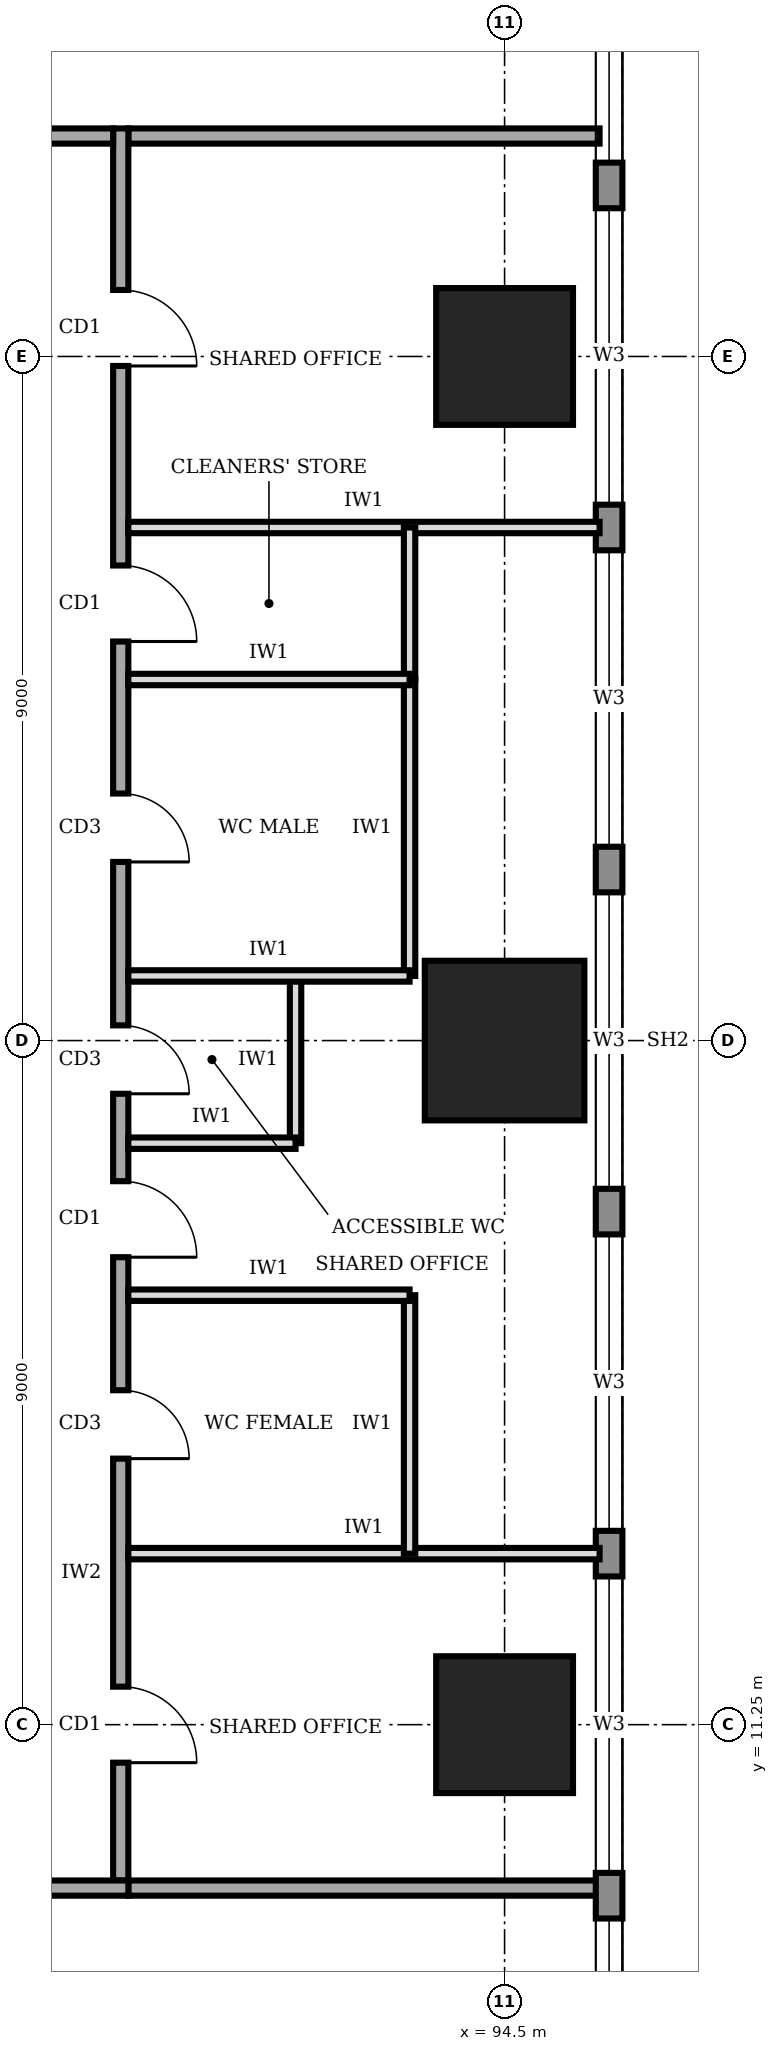
"""IFC4 building model, lengths in metres.
Left out: names, types, materials, properties, quantities, classifications, styles, units other than length and angle.
Written with IfcOpenShell. Run it as: python <this file> out.ifc"""

import sys

from ifc_helpers import new_model, si_unit, direction, frame, frame_2d, origin, origin_2d, place, context, subcontext, project, spatial, rectangle, extrude, element, fill, save


model = new_model("IFC4")
c1 = context("Model", 3, precision=1e-05, world=origin(), true_north=direction((0.0, 1.0)))
c2 = subcontext(c1, "Body", "Model", "MODEL_VIEW")
j1 = project(units=[si_unit("LENGTHUNIT", "METRE"), si_unit("PLANEANGLEUNIT", "RADIAN")], contexts=[c1])
p1 = place(None, origin())
s1 = spatial("IfcSite", under=j1, at=p1, CompositionType="ELEMENT")
p2 = place(p1, origin())
s2 = spatial("IfcBuilding", under=s1, at=p2, CompositionType="ELEMENT")
p3 = place(p2, frame((0.0, 0.0, 181.0)))
s3 = spatial("IfcBuildingStorey", under=s2, at=p3, CompositionType="ELEMENT", Elevation=181.0)
p4 = place(p3, frame((94.5, 11.25, 0.0), z_axis=(0.0, 0.0, 1.0), x_axis=(1.0, 0.0, 0.0)))
e1 = element("IfcColumn", 1, at=p4, inside=s3, PredefinedType="COLUMN", context=c2, shape_type="SweptSolid", body=[
    extrude(rectangle(XDim=1.8, YDim=1.8, at=origin_2d()), origin(), (0.0, 0.0, 1.0), 4.0),
])
p5 = place(p3, frame((94.5, 20.25, 0.0), z_axis=(0.0, 0.0, 1.0), x_axis=(1.0, 0.0, 0.0)))
e2 = element("IfcColumn", 2, at=p5, inside=s3, PredefinedType="COLUMN", context=c2, shape_type="SweptSolid", body=[
    extrude(rectangle(XDim=2.1, YDim=2.1, at=origin_2d()), origin(), (0.0, 0.0, 1.0), 4.0),
])
p6 = place(p3, frame((94.5, 29.25, 0.0), z_axis=(0.0, 0.0, 1.0), x_axis=(1.0, 0.0, 0.0)))
e3 = element("IfcColumn", 3, at=p6, inside=s3, PredefinedType="COLUMN", context=c2, shape_type="SweptSolid", body=[
    extrude(rectangle(XDim=1.8, YDim=1.8, at=origin_2d()), origin(), (0.0, 0.0, 1.0), 4.0),
])
p7 = place(p3, frame((95.875, 3.32, 0.0), z_axis=(0.0, 0.0, 1.0), x_axis=(0.0, 1.0, 0.0)))
e4 = element("IfcWall", 4, at=p7, inside=s3, PredefinedType="STANDARD", context=c2, shape_type="SweptSolid", body=[
    extrude(rectangle(XDim=33.86, YDim=0.35, at=frame_2d((16.93, 0.0))), origin(), (0.0, 0.0, 1.0), 3.75),
])
p8 = place(p7, frame((1.48, 0.0, 0.95)))
e5 = element("IfcOpeningElement", 5, at=p8, cuts=e4, PredefinedType="OPENING", context=c2, shape_type="SweptSolid", body=[
    extrude(rectangle(XDim=3.9, YDim=1.8, at=frame_2d((1.95, 0.9))), frame((0.0, 0.185, 0.0), z_axis=(0.0, -1.0, 0.0), x_axis=(1.0, 0.0, 0.0)), (0.0, 0.0, 1.0), 0.37),
])
p9 = place(p7, frame((5.98, 0.0, 0.95)))
e6 = element("IfcOpeningElement", 6, at=p9, cuts=e4, PredefinedType="OPENING", context=c2, shape_type="SweptSolid", body=[
    extrude(rectangle(XDim=3.9, YDim=1.8, at=frame_2d((1.95, 0.9))), frame((0.0, 0.185, 0.0), z_axis=(0.0, -1.0, 0.0), x_axis=(1.0, 0.0, 0.0)), (0.0, 0.0, 1.0), 0.37),
])
p10 = place(p7, frame((10.48, 0.0, 0.95)))
e7 = element("IfcOpeningElement", 7, at=p10, cuts=e4, PredefinedType="OPENING", context=c2, shape_type="SweptSolid", body=[
    extrude(rectangle(XDim=3.9, YDim=1.8, at=frame_2d((1.95, 0.9))), frame((0.0, 0.185, 0.0), z_axis=(0.0, -1.0, 0.0), x_axis=(1.0, 0.0, 0.0)), (0.0, 0.0, 1.0), 0.37),
])
p11 = place(p7, frame((14.98, 0.0, 0.95)))
e8 = element("IfcOpeningElement", 8, at=p11, cuts=e4, PredefinedType="OPENING", context=c2, shape_type="SweptSolid", body=[
    extrude(rectangle(XDim=3.9, YDim=1.8, at=frame_2d((1.95, 0.9))), frame((0.0, 0.185, 0.0), z_axis=(0.0, -1.0, 0.0), x_axis=(1.0, 0.0, 0.0)), (0.0, 0.0, 1.0), 0.37),
])
p12 = place(p7, frame((19.48, 0.0, 0.95)))
e9 = element("IfcOpeningElement", 9, at=p12, cuts=e4, PredefinedType="OPENING", context=c2, shape_type="SweptSolid", body=[
    extrude(rectangle(XDim=3.9, YDim=1.8, at=frame_2d((1.95, 0.9))), frame((0.0, 0.185, 0.0), z_axis=(0.0, -1.0, 0.0), x_axis=(1.0, 0.0, 0.0)), (0.0, 0.0, 1.0), 0.37),
])
p13 = place(p7, frame((23.98, 0.0, 0.95)))
e10 = element("IfcOpeningElement", 10, at=p13, cuts=e4, PredefinedType="OPENING", context=c2, shape_type="SweptSolid", body=[
    extrude(rectangle(XDim=3.9, YDim=1.8, at=frame_2d((1.95, 0.9))), frame((0.0, 0.185, 0.0), z_axis=(0.0, -1.0, 0.0), x_axis=(1.0, 0.0, 0.0)), (0.0, 0.0, 1.0), 0.37),
])
p14 = place(p7, frame((28.48, 0.0, 0.95)))
e11 = element("IfcOpeningElement", 11, at=p14, cuts=e4, PredefinedType="OPENING", context=c2, shape_type="SweptSolid", body=[
    extrude(rectangle(XDim=3.9, YDim=1.8, at=frame_2d((1.95, 0.9))), frame((0.0, 0.185, 0.0), z_axis=(0.0, -1.0, 0.0), x_axis=(1.0, 0.0, 0.0)), (0.0, 0.0, 1.0), 0.37),
])
p15 = place(p3, frame((72.65, 9.1, 0.0), z_axis=(0.0, 0.0, 1.0), x_axis=(1.0, 0.0, 0.0)))
e12 = element("IfcWall", 12, at=p15, inside=s3, PredefinedType="SOLIDWALL", context=c2, shape_type="SweptSolid", body=[
    extrude(rectangle(XDim=16.9, YDim=0.2, at=frame_2d((8.45, 0.0))), origin(), (0.0, 0.0, 1.0), 3.75),
])
p16 = place(p15, frame((1.325, 0.0, 0.0)))
e13 = element("IfcOpeningElement", 13, at=p16, cuts=e12, PredefinedType="OPENING", context=c2, shape_type="SweptSolid", body=[
    extrude(rectangle(XDim=1.0, YDim=2.1, at=frame_2d((0.5, 1.05))), frame((0.0, 0.11, 0.0), z_axis=(0.0, -1.0, 0.0), x_axis=(1.0, 0.0, 0.0)), (0.0, 0.0, 1.0), 0.22),
])
p17 = place(p15, frame((9.475, 0.0, 0.0)))
e14 = element("IfcOpeningElement", 14, at=p17, cuts=e12, PredefinedType="OPENING", context=c2, shape_type="SweptSolid", body=[
    extrude(rectangle(XDim=1.8, YDim=2.1, at=frame_2d((0.9, 1.05))), frame((0.0, 0.11, 0.0), z_axis=(0.0, -1.0, 0.0), x_axis=(1.0, 0.0, 0.0)), (0.0, 0.0, 1.0), 0.22),
])
p18 = place(p3, frame((89.45, 9.2, 0.0), z_axis=(0.0, 0.0, 1.0), x_axis=(0.0, 1.0, 0.0)))
e15 = element("IfcWall", 15, at=p18, inside=s3, PredefinedType="SOLIDWALL", context=c2, shape_type="SweptSolid", body=[
    extrude(rectangle(XDim=23.05, YDim=0.2, at=frame_2d((11.525, 0.0))), origin(), (0.0, 0.0, 1.0), 3.75),
])
p19 = place(p18, frame((1.55, 0.0, 0.0)))
e16 = element("IfcOpeningElement", 16, at=p19, cuts=e15, PredefinedType="OPENING", context=c2, shape_type="SweptSolid", body=[
    extrude(rectangle(XDim=1.0, YDim=2.1, at=frame_2d((0.5, 1.05))), frame((0.0, 0.11, 0.0), z_axis=(0.0, -1.0, 0.0), x_axis=(1.0, 0.0, 0.0)), (0.0, 0.0, 1.0), 0.22),
])
p20 = place(p18, frame((5.55, 0.0, 0.0)))
e17 = element("IfcOpeningElement", 17, at=p20, cuts=e15, PredefinedType="OPENING", context=c2, shape_type="SweptSolid", body=[
    extrude(rectangle(XDim=0.9, YDim=2.1, at=frame_2d((0.45, 1.05))), frame((0.0, 0.11, 0.0), z_axis=(0.0, -1.0, 0.0), x_axis=(1.0, 0.0, 0.0)), (0.0, 0.0, 1.0), 0.22),
])
p21 = place(p18, frame((10.35, 0.0, 0.0)))
e18 = element("IfcOpeningElement", 18, at=p21, cuts=e15, PredefinedType="OPENING", context=c2, shape_type="SweptSolid", body=[
    extrude(rectangle(XDim=0.9, YDim=2.1, at=frame_2d((0.45, 1.05))), frame((0.0, 0.11, 0.0), z_axis=(0.0, -1.0, 0.0), x_axis=(1.0, 0.0, 0.0)), (0.0, 0.0, 1.0), 0.22),
])
p22 = place(p18, frame((13.4, 0.0, 0.0)))
e19 = element("IfcOpeningElement", 19, at=p22, cuts=e15, PredefinedType="OPENING", context=c2, shape_type="SweptSolid", body=[
    extrude(rectangle(XDim=0.9, YDim=2.1, at=frame_2d((0.45, 1.05))), frame((0.0, 0.11, 0.0), z_axis=(0.0, -1.0, 0.0), x_axis=(1.0, 0.0, 0.0)), (0.0, 0.0, 1.0), 0.22),
])
p23 = place(p18, frame((16.3, 0.0, 0.0)))
e20 = element("IfcOpeningElement", 20, at=p23, cuts=e15, PredefinedType="OPENING", context=c2, shape_type="SweptSolid", body=[
    extrude(rectangle(XDim=1.0, YDim=2.1, at=frame_2d((0.5, 1.05))), frame((0.0, 0.11, 0.0), z_axis=(0.0, -1.0, 0.0), x_axis=(1.0, 0.0, 0.0)), (0.0, 0.0, 1.0), 0.22),
])
p24 = place(p18, frame((8.2, 0.0, 0.0)))
e21 = element("IfcOpeningElement", 21, at=p24, cuts=e15, PredefinedType="OPENING", context=c2, shape_type="SweptSolid", body=[
    extrude(rectangle(XDim=1.0, YDim=2.1, at=frame_2d((0.5, 1.05))), frame((0.0, 0.11, 0.0), z_axis=(0.0, -1.0, 0.0), x_axis=(1.0, 0.0, 0.0)), (0.0, 0.0, 1.0), 0.22),
])
p25 = place(p18, frame((19.925, 0.0, 0.0)))
e22 = element("IfcOpeningElement", 22, at=p25, cuts=e15, PredefinedType="OPENING", context=c2, shape_type="SweptSolid", body=[
    extrude(rectangle(XDim=1.0, YDim=2.1, at=frame_2d((0.5, 1.05))), frame((0.0, 0.11, 0.0), z_axis=(0.0, -1.0, 0.0), x_axis=(1.0, 0.0, 0.0)), (0.0, 0.0, 1.0), 0.22),
])
p26 = place(p3, frame((89.35, 32.15, 0.0), z_axis=(0.0, 0.0, 1.0), x_axis=(-1.0, 0.0, 0.0)))
e23 = element("IfcWall", 23, at=p26, inside=s3, PredefinedType="SOLIDWALL", context=c2, shape_type="SweptSolid", body=[
    extrude(rectangle(XDim=16.9, YDim=0.2, at=frame_2d((8.45, 0.0))), origin(), (0.0, 0.0, 1.0), 3.75),
])
p27 = place(p26, frame((3.575, 0.0, 0.0)))
e24 = element("IfcOpeningElement", 24, at=p27, cuts=e23, PredefinedType="OPENING", context=c2, shape_type="SweptSolid", body=[
    extrude(rectangle(XDim=1.0, YDim=2.1, at=frame_2d((0.5, 1.05))), frame((0.0, 0.11, 0.0), z_axis=(0.0, -1.0, 0.0), x_axis=(1.0, 0.0, 0.0)), (0.0, 0.0, 1.0), 0.22),
])
for number, where, z_axis, x_axis in (
    (25, (89.55, 9.1, 0.0), (0.0, 0.0, 1.0), (1.0, 0.0, 0.0)),
    (26, (89.55, 32.15, 0.0), (0.0, 0.0, 1.0), (1.0, 0.0, 0.0)),
):
    element("IfcWall", number, at=place(p3, frame(where, z_axis=z_axis, x_axis=x_axis)), inside=s3, PredefinedType="SOLIDWALL", context=c2, shape_type="SweptSolid", body=[
        extrude(rectangle(XDim=6.2, YDim=0.2, at=frame_2d((3.1, 0.0))), origin(), (0.0, 0.0, 1.0), 3.75),
    ])
for number, where, z_axis, x_axis in (
    (27, (89.55, 13.5, 0.0), (0.0, 0.0, 1.0), (1.0, 0.0, 0.0)),
    (28, (89.55, 27.0, 0.0), (0.0, 0.0, 1.0), (1.0, 0.0, 0.0)),
):
    element("IfcWall", number, at=place(p3, frame(where, z_axis=z_axis, x_axis=x_axis)), inside=s3, PredefinedType="PARTITIONING", context=c2, shape_type="SweptSolid", body=[
        extrude(rectangle(XDim=6.2, YDim=0.15, at=frame_2d((3.1, 0.0))), origin(), (0.0, 0.0, 1.0), 3.75),
    ])
p28 = place(p3, frame((89.55, 16.9, 0.0), z_axis=(0.0, 0.0, 1.0), x_axis=(1.0, 0.0, 0.0)))
e29 = element("IfcWall", 29, at=p28, inside=s3, PredefinedType="PARTITIONING", context=c2, shape_type="SweptSolid", body=[
    extrude(rectangle(XDim=3.7, YDim=0.15, at=frame_2d((1.85, 0.0))), origin(), (0.0, 0.0, 1.0), 3.75),
])
p29 = place(p3, frame((89.55, 18.9, 0.0), z_axis=(0.0, 0.0, 1.0), x_axis=(1.0, 0.0, 0.0)))
e30 = element("IfcWall", 30, at=p29, inside=s3, PredefinedType="PARTITIONING", context=c2, shape_type="SweptSolid", body=[
    extrude(rectangle(XDim=2.2, YDim=0.15, at=frame_2d((1.1, 0.0))), origin(), (0.0, 0.0, 1.0), 3.75),
])
p30 = place(p3, frame((89.55, 21.1, 0.0), z_axis=(0.0, 0.0, 1.0), x_axis=(1.0, 0.0, 0.0)))
e31 = element("IfcWall", 31, at=p30, inside=s3, PredefinedType="PARTITIONING", context=c2, shape_type="SweptSolid", body=[
    extrude(rectangle(XDim=3.7, YDim=0.15, at=frame_2d((1.85, 0.0))), origin(), (0.0, 0.0, 1.0), 2.85),
])
p31 = place(p3, frame((89.55, 25.0, 0.0), z_axis=(0.0, 0.0, 1.0), x_axis=(1.0, 0.0, 0.0)))
e32 = element("IfcWall", 32, at=p31, inside=s3, PredefinedType="PARTITIONING", context=c2, shape_type="SweptSolid", body=[
    extrude(rectangle(XDim=3.7, YDim=0.15, at=frame_2d((1.85, 0.0))), origin(), (0.0, 0.0, 1.0), 3.75),
])
p32 = place(p3, frame((93.25, 13.5, 0.0), z_axis=(0.0, 0.0, 1.0), x_axis=(0.0, 1.0, 0.0)))
e33 = element("IfcWall", 33, at=p32, inside=s3, PredefinedType="PARTITIONING", context=c2, shape_type="SweptSolid", body=[
    extrude(rectangle(XDim=3.4, YDim=0.15, at=frame_2d((1.7, 0.0))), origin(), (0.0, 0.0, 1.0), 3.75),
])
p33 = place(p3, frame((91.75, 18.9, 0.0), z_axis=(0.0, 0.0, 1.0), x_axis=(0.0, 1.0, 0.0)))
e34 = element("IfcWall", 34, at=p33, inside=s3, PredefinedType="PARTITIONING", context=c2, shape_type="SweptSolid", body=[
    extrude(rectangle(XDim=2.2, YDim=0.15, at=frame_2d((1.1, 0.0))), origin(), (0.0, 0.0, 1.0), 3.75),
])
p34 = place(p3, frame((93.25, 21.1, 0.0), z_axis=(0.0, 0.0, 1.0), x_axis=(0.0, 1.0, 0.0)))
e35 = element("IfcWall", 35, at=p34, inside=s3, PredefinedType="PARTITIONING", context=c2, shape_type="SweptSolid", body=[
    extrude(rectangle(XDim=3.9, YDim=0.15, at=frame_2d((1.95, 0.0))), origin(), (0.0, 0.0, 1.0), 3.75),
])
p35 = place(p3, frame((93.25, 25.0, 0.0), z_axis=(0.0, 0.0, 1.0), x_axis=(0.0, 1.0, 0.0)))
e36 = element("IfcWall", 36, at=p35, inside=s3, PredefinedType="PARTITIONING", context=c2, shape_type="SweptSolid", body=[
    extrude(rectangle(XDim=2.0, YDim=0.15, at=frame_2d((1.0, 0.0))), origin(), (0.0, 0.0, 1.0), 3.75),
])
p36 = place(p8, origin())
e37 = element("IfcWindow", 37, at=p36, inside=s3, PartitioningType="SINGLE_PANEL", PredefinedType="WINDOW", context=c2, shape_type="SweptSolid", body=[
    extrude(rectangle(XDim=3.9, YDim=1.8, at=frame_2d((1.95, 0.9))), frame((0.0, 0.03, 0.0), z_axis=(0.0, -1.0, 0.0), x_axis=(1.0, 0.0, 0.0)), (0.0, 0.0, 1.0), 0.06),
])
fill(e5, e37)
p37 = place(p9, origin())
e38 = element("IfcWindow", 38, at=p37, inside=s3, PartitioningType="SINGLE_PANEL", PredefinedType="WINDOW", context=c2, shape_type="SweptSolid", body=[
    extrude(rectangle(XDim=3.9, YDim=1.8, at=frame_2d((1.95, 0.9))), frame((0.0, 0.03, 0.0), z_axis=(0.0, -1.0, 0.0), x_axis=(1.0, 0.0, 0.0)), (0.0, 0.0, 1.0), 0.06),
])
fill(e6, e38)
p38 = place(p10, origin())
e39 = element("IfcWindow", 39, at=p38, inside=s3, PartitioningType="SINGLE_PANEL", PredefinedType="WINDOW", context=c2, shape_type="SweptSolid", body=[
    extrude(rectangle(XDim=3.9, YDim=1.8, at=frame_2d((1.95, 0.9))), frame((0.0, 0.03, 0.0), z_axis=(0.0, -1.0, 0.0), x_axis=(1.0, 0.0, 0.0)), (0.0, 0.0, 1.0), 0.06),
])
fill(e7, e39)
p39 = place(p11, origin())
e40 = element("IfcWindow", 40, at=p39, inside=s3, PartitioningType="SINGLE_PANEL", PredefinedType="WINDOW", context=c2, shape_type="SweptSolid", body=[
    extrude(rectangle(XDim=3.9, YDim=1.8, at=frame_2d((1.95, 0.9))), frame((0.0, 0.03, 0.0), z_axis=(0.0, -1.0, 0.0), x_axis=(1.0, 0.0, 0.0)), (0.0, 0.0, 1.0), 0.06),
])
fill(e8, e40)
p40 = place(p12, origin())
e41 = element("IfcWindow", 41, at=p40, inside=s3, PartitioningType="SINGLE_PANEL", PredefinedType="WINDOW", context=c2, shape_type="SweptSolid", body=[
    extrude(rectangle(XDim=3.9, YDim=1.8, at=frame_2d((1.95, 0.9))), frame((0.0, 0.03, 0.0), z_axis=(0.0, -1.0, 0.0), x_axis=(1.0, 0.0, 0.0)), (0.0, 0.0, 1.0), 0.06),
])
fill(e9, e41)
p41 = place(p13, origin())
e42 = element("IfcWindow", 42, at=p41, inside=s3, PartitioningType="SINGLE_PANEL", PredefinedType="WINDOW", context=c2, shape_type="SweptSolid", body=[
    extrude(rectangle(XDim=3.9, YDim=1.8, at=frame_2d((1.95, 0.9))), frame((0.0, 0.03, 0.0), z_axis=(0.0, -1.0, 0.0), x_axis=(1.0, 0.0, 0.0)), (0.0, 0.0, 1.0), 0.06),
])
fill(e10, e42)
p42 = place(p14, origin())
e43 = element("IfcWindow", 43, at=p42, inside=s3, PartitioningType="SINGLE_PANEL", PredefinedType="WINDOW", context=c2, shape_type="SweptSolid", body=[
    extrude(rectangle(XDim=3.9, YDim=1.8, at=frame_2d((1.95, 0.9))), frame((0.0, 0.03, 0.0), z_axis=(0.0, -1.0, 0.0), x_axis=(1.0, 0.0, 0.0)), (0.0, 0.0, 1.0), 0.06),
])
fill(e11, e43)
p43 = place(p19, frame((1.0, 0.0, 0.0), z_axis=(0.0, 0.0, 1.0), x_axis=(-1.0, 0.0, 0.0)))
e44 = element("IfcDoor", 44, at=p43, inside=s3, OperationType="SINGLE_SWING_RIGHT", PredefinedType="DOOR", context=c2, shape_type="SweptSolid", body=[
    extrude(rectangle(XDim=1.0, YDim=2.1, at=frame_2d((0.5, 1.05))), frame((0.0, 0.025, 0.0), z_axis=(0.0, -1.0, 0.0), x_axis=(1.0, 0.0, 0.0)), (0.0, 0.0, 1.0), 0.05),
])
fill(e16, e44)
p44 = place(p20, frame((0.9, 0.0, 0.0), z_axis=(0.0, 0.0, 1.0), x_axis=(-1.0, 0.0, 0.0)))
e45 = element("IfcDoor", 45, at=p44, inside=s3, OperationType="SINGLE_SWING_RIGHT", PredefinedType="DOOR", context=c2, shape_type="SweptSolid", body=[
    extrude(rectangle(XDim=0.9, YDim=2.1, at=frame_2d((0.45, 1.05))), frame((0.0, 0.025, 0.0), z_axis=(0.0, -1.0, 0.0), x_axis=(1.0, 0.0, 0.0)), (0.0, 0.0, 1.0), 0.05),
])
fill(e17, e45)
p45 = place(p21, frame((0.9, 0.0, 0.0), z_axis=(0.0, 0.0, 1.0), x_axis=(-1.0, 0.0, 0.0)))
e46 = element("IfcDoor", 46, at=p45, inside=s3, OperationType="SINGLE_SWING_RIGHT", PredefinedType="DOOR", context=c2, shape_type="SweptSolid", body=[
    extrude(rectangle(XDim=0.9, YDim=2.1, at=frame_2d((0.45, 1.05))), frame((0.0, 0.025, 0.0), z_axis=(0.0, -1.0, 0.0), x_axis=(1.0, 0.0, 0.0)), (0.0, 0.0, 1.0), 0.05),
])
fill(e18, e46)
p46 = place(p22, frame((0.9, 0.0, 0.0), z_axis=(0.0, 0.0, 1.0), x_axis=(-1.0, 0.0, 0.0)))
e47 = element("IfcDoor", 47, at=p46, inside=s3, OperationType="SINGLE_SWING_RIGHT", PredefinedType="DOOR", context=c2, shape_type="SweptSolid", body=[
    extrude(rectangle(XDim=0.9, YDim=2.1, at=frame_2d((0.45, 1.05))), frame((0.0, 0.025, 0.0), z_axis=(0.0, -1.0, 0.0), x_axis=(1.0, 0.0, 0.0)), (0.0, 0.0, 1.0), 0.05),
])
fill(e19, e47)
p47 = place(p23, frame((1.0, 0.0, 0.0), z_axis=(0.0, 0.0, 1.0), x_axis=(-1.0, 0.0, 0.0)))
e48 = element("IfcDoor", 48, at=p47, inside=s3, OperationType="SINGLE_SWING_RIGHT", PredefinedType="DOOR", context=c2, shape_type="SweptSolid", body=[
    extrude(rectangle(XDim=1.0, YDim=2.1, at=frame_2d((0.5, 1.05))), frame((0.0, 0.025, 0.0), z_axis=(0.0, -1.0, 0.0), x_axis=(1.0, 0.0, 0.0)), (0.0, 0.0, 1.0), 0.05),
])
fill(e20, e48)
p48 = place(p24, frame((1.0, 0.0, 0.0), z_axis=(0.0, 0.0, 1.0), x_axis=(-1.0, 0.0, 0.0)))
e49 = element("IfcDoor", 49, at=p48, inside=s3, OperationType="SINGLE_SWING_RIGHT", PredefinedType="DOOR", context=c2, shape_type="SweptSolid", body=[
    extrude(rectangle(XDim=1.0, YDim=2.1, at=frame_2d((0.5, 1.05))), frame((0.0, 0.025, 0.0), z_axis=(0.0, -1.0, 0.0), x_axis=(1.0, 0.0, 0.0)), (0.0, 0.0, 1.0), 0.05),
])
fill(e21, e49)
p49 = place(p25, frame((1.0, 0.0, 0.0), z_axis=(0.0, 0.0, 1.0), x_axis=(-1.0, 0.0, 0.0)))
e50 = element("IfcDoor", 50, at=p49, inside=s3, OperationType="SINGLE_SWING_RIGHT", PredefinedType="DOOR", context=c2, shape_type="SweptSolid", body=[
    extrude(rectangle(XDim=1.0, YDim=2.1, at=frame_2d((0.5, 1.05))), frame((0.0, 0.025, 0.0), z_axis=(0.0, -1.0, 0.0), x_axis=(1.0, 0.0, 0.0)), (0.0, 0.0, 1.0), 0.05),
])
fill(e22, e50)
save(model, sys.argv[1])
